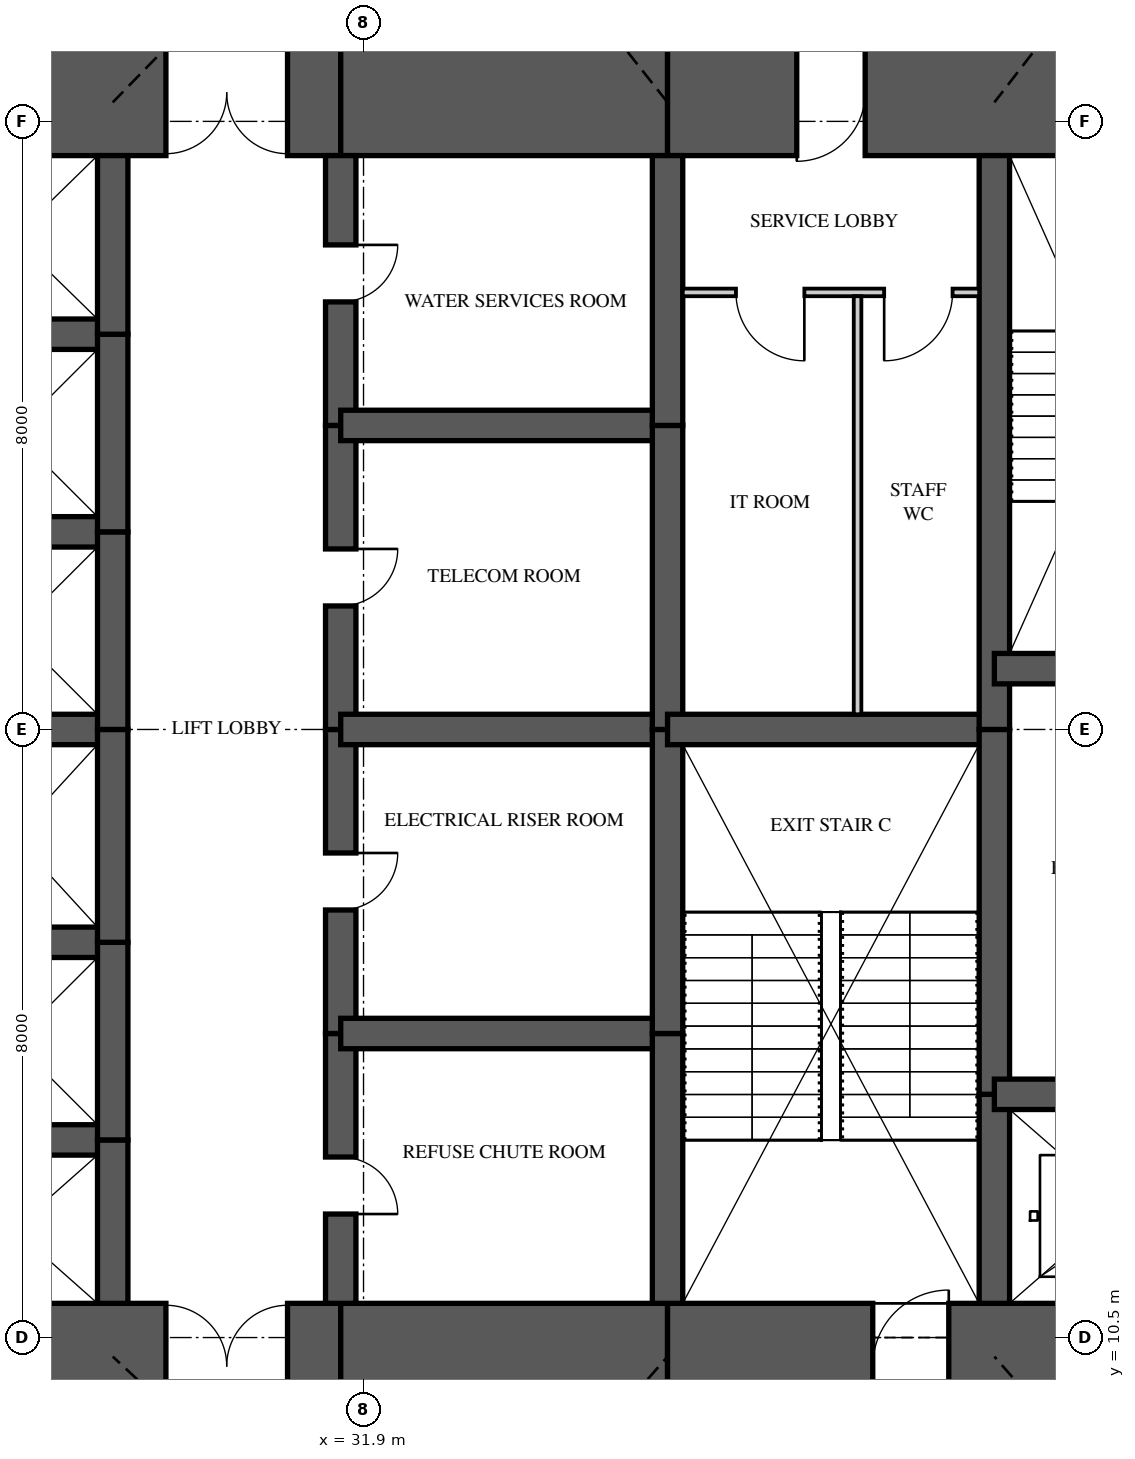
"""IFC4 building model, lengths in metres.
Left out: names, types, materials, properties, quantities, classifications, styles, units other than length and angle.
Written with IfcOpenShell. Run it as: python <this file> out.ifc"""

import sys

from ifc_helpers import new_model, si_unit, direction, frame, frame_2d, origin, place, context, subcontext, project, spatial, rectangle, extrude, element, fill, save


model = new_model("IFC4")
c1 = context("Model", 3, precision=1e-05, world=origin(), true_north=direction((0.0, 1.0)))
c2 = subcontext(c1, "Body", "Model", "MODEL_VIEW")
j1 = project(units=[si_unit("LENGTHUNIT", "METRE"), si_unit("PLANEANGLEUNIT", "RADIAN")], contexts=[c1])
p1 = place(None, origin())
s1 = spatial("IfcSite", under=j1, at=p1, CompositionType="ELEMENT")
p2 = place(p1, origin())
s2 = spatial("IfcBuilding", under=s1, at=p2, CompositionType="ELEMENT")
p3 = place(p2, frame((0.0, 0.0, 79.75)))
s3 = spatial("IfcBuildingStorey", under=s2, at=p3, CompositionType="ELEMENT", Elevation=79.75)
p4 = place(p3, frame((26.0, 10.125, 0.0), z_axis=(0.0, 0.0, 1.0), x_axis=(1.0, 0.0, 0.0)))
e1 = element("IfcWall", 1, at=p4, inside=s3, PredefinedType="SHEAR", context=c2, shape_type="SweptSolid", body=[
    extrude(rectangle(XDim=5.6, YDim=1.65, at=frame_2d((2.8, 0.0))), origin(), (0.0, 0.0, 1.0), 5.0),
])
p5 = place(p4, frame((3.3, 0.0, 0.0)))
e2 = element("IfcOpeningElement", 2, at=p5, cuts=e1, PredefinedType="OPENING", context=c2, shape_type="SweptSolid", body=[
    extrude(rectangle(XDim=1.6, YDim=2.1, at=frame_2d((0.8, 1.05))), frame((0.0, 0.835, 0.0), z_axis=(0.0, -1.0, 0.0), x_axis=(1.0, 0.0, 0.0)), (0.0, 0.0, 1.0), 1.67),
])
p6 = place(p3, frame((31.6, 10.125, 0.0), z_axis=(0.0, 0.0, 1.0), x_axis=(1.0, 0.0, 0.0)))
e3 = element("IfcWall", 3, at=p6, inside=s3, PredefinedType="SHEAR", context=c2, shape_type="SweptSolid", body=[
    extrude(rectangle(XDim=4.3, YDim=1.65, at=frame_2d((2.15, 0.0))), origin(), (0.0, 0.0, 1.0), 5.0),
])
p7 = place(p3, frame((35.9, 10.125, 0.0), z_axis=(0.0, 0.0, 1.0), x_axis=(1.0, 0.0, 0.0)))
e4 = element("IfcWall", 4, at=p7, inside=s3, PredefinedType="SHEAR", context=c2, shape_type="SweptSolid", body=[
    extrude(rectangle(XDim=8.375, YDim=1.65, at=frame_2d((4.188, 0.0))), origin(), (0.0, 0.0, 1.0), 5.0),
])
p8 = place(p7, frame((2.7, 0.0, 0.0)))
e5 = element("IfcOpeningElement", 5, at=p8, cuts=e4, PredefinedType="OPENING", context=c2, shape_type="SweptSolid", body=[
    extrude(rectangle(XDim=1.0, YDim=2.1, at=frame_2d((0.5, 1.05))), frame((0.0, 0.835, 0.0), z_axis=(0.0, -1.0, 0.0), x_axis=(1.0, 0.0, 0.0)), (0.0, 0.0, 1.0), 1.67),
])
p9 = place(p3, frame((44.275, 26.875, 0.0), z_axis=(0.0, 0.0, 1.0), x_axis=(-1.0, 0.0, 0.0)))
e6 = element("IfcWall", 6, at=p9, inside=s3, PredefinedType="SHEAR", context=c2, shape_type="SweptSolid", body=[
    extrude(rectangle(XDim=8.375, YDim=1.65, at=frame_2d((4.188, 0.0))), origin(), (0.0, 0.0, 1.0), 5.0),
])
p10 = place(p9, frame((5.775, 0.0, 0.0)))
e7 = element("IfcOpeningElement", 7, at=p10, cuts=e6, PredefinedType="OPENING", context=c2, shape_type="SweptSolid", body=[
    extrude(rectangle(XDim=0.9, YDim=2.1, at=frame_2d((0.45, 1.05))), frame((0.0, 0.835, 0.0), z_axis=(0.0, -1.0, 0.0), x_axis=(1.0, 0.0, 0.0)), (0.0, 0.0, 1.0), 1.67),
])
p11 = place(p3, frame((35.9, 26.875, 0.0), z_axis=(0.0, 0.0, 1.0), x_axis=(-1.0, 0.0, 0.0)))
e8 = element("IfcWall", 8, at=p11, inside=s3, PredefinedType="SHEAR", context=c2, shape_type="SweptSolid", body=[
    extrude(rectangle(XDim=4.3, YDim=1.65, at=frame_2d((2.15, 0.0))), origin(), (0.0, 0.0, 1.0), 5.0),
])
p12 = place(p3, frame((31.6, 26.875, 0.0), z_axis=(0.0, 0.0, 1.0), x_axis=(-1.0, 0.0, 0.0)))
e9 = element("IfcWall", 9, at=p12, inside=s3, PredefinedType="SHEAR", context=c2, shape_type="SweptSolid", body=[
    extrude(rectangle(XDim=5.6, YDim=1.65, at=frame_2d((2.8, 0.0))), origin(), (0.0, 0.0, 1.0), 5.0),
])
p13 = place(p12, frame((0.7, 0.0, 0.0)))
e10 = element("IfcOpeningElement", 10, at=p13, cuts=e9, PredefinedType="OPENING", context=c2, shape_type="SweptSolid", body=[
    extrude(rectangle(XDim=1.6, YDim=2.1, at=frame_2d((0.8, 1.05))), frame((0.0, 0.835, 0.0), z_axis=(0.0, -1.0, 0.0), x_axis=(1.0, 0.0, 0.0)), (0.0, 0.0, 1.0), 1.67),
])
p14 = place(p3, frame((28.6, 10.95, 0.0), z_axis=(0.0, 0.0, 1.0), x_axis=(0.0, 1.0, 0.0)))
e11 = element("IfcWall", 11, at=p14, inside=s3, PredefinedType="SHEAR", context=c2, shape_type="SweptSolid", body=[
    extrude(rectangle(XDim=2.15, YDim=0.4, at=frame_2d((1.075, 0.0))), origin(), (0.0, 0.0, 1.0), 5.0),
])
p15 = place(p3, frame((28.6, 13.1, 0.0), z_axis=(0.0, 0.0, 1.0), x_axis=(0.0, 1.0, 0.0)))
e12 = element("IfcWall", 12, at=p15, inside=s3, PredefinedType="SHEAR", context=c2, shape_type="SweptSolid", body=[
    extrude(rectangle(XDim=2.6, YDim=0.4, at=frame_2d((1.3, 0.0))), origin(), (0.0, 0.0, 1.0), 5.0),
])
p16 = place(p3, frame((28.6, 15.7, 0.0), z_axis=(0.0, 0.0, 1.0), x_axis=(0.0, 1.0, 0.0)))
e13 = element("IfcWall", 13, at=p16, inside=s3, PredefinedType="SHEAR", context=c2, shape_type="SweptSolid", body=[
    extrude(rectangle(XDim=2.8, YDim=0.4, at=frame_2d((1.4, 0.0))), origin(), (0.0, 0.0, 1.0), 5.0),
])
p17 = place(p3, frame((28.6, 18.5, 0.0), z_axis=(0.0, 0.0, 1.0), x_axis=(0.0, 1.0, 0.0)))
e14 = element("IfcWall", 14, at=p17, inside=s3, PredefinedType="SHEAR", context=c2, shape_type="SweptSolid", body=[
    extrude(rectangle(XDim=2.6, YDim=0.4, at=frame_2d((1.3, 0.0))), origin(), (0.0, 0.0, 1.0), 5.0),
])
p18 = place(p3, frame((28.6, 21.1, 0.0), z_axis=(0.0, 0.0, 1.0), x_axis=(0.0, 1.0, 0.0)))
e15 = element("IfcWall", 15, at=p18, inside=s3, PredefinedType="SHEAR", context=c2, shape_type="SweptSolid", body=[
    extrude(rectangle(XDim=2.6, YDim=0.4, at=frame_2d((1.3, 0.0))), origin(), (0.0, 0.0, 1.0), 5.0),
])
p19 = place(p3, frame((28.6, 23.7, 0.0), z_axis=(0.0, 0.0, 1.0), x_axis=(0.0, 1.0, 0.0)))
e16 = element("IfcWall", 16, at=p19, inside=s3, PredefinedType="SHEAR", context=c2, shape_type="SweptSolid", body=[
    extrude(rectangle(XDim=2.35, YDim=0.4, at=frame_2d((1.175, 0.0))), origin(), (0.0, 0.0, 1.0), 5.0),
])
p20 = place(p3, frame((31.6, 10.95, 0.0), z_axis=(0.0, 0.0, 1.0), x_axis=(0.0, 1.0, 0.0)))
e17 = element("IfcWall", 17, at=p20, inside=s3, PredefinedType="SHEAR", context=c2, shape_type="SweptSolid", body=[
    extrude(rectangle(XDim=3.55, YDim=0.4, at=frame_2d((1.775, 0.0))), origin(), (0.0, 0.0, 1.0), 5.0),
])
p21 = place(p20, frame((1.175, 0.0, 0.0)))
e18 = element("IfcOpeningElement", 18, at=p21, cuts=e17, PredefinedType="OPENING", context=c2, shape_type="SweptSolid", body=[
    extrude(rectangle(XDim=0.75, YDim=2.1, at=frame_2d((0.375, 1.05))), frame((0.0, 0.21, 0.0), z_axis=(0.0, -1.0, 0.0), x_axis=(1.0, 0.0, 0.0)), (0.0, 0.0, 1.0), 0.42),
])
p22 = place(p3, frame((31.6, 14.5, 0.0), z_axis=(0.0, 0.0, 1.0), x_axis=(0.0, 1.0, 0.0)))
e19 = element("IfcWall", 19, at=p22, inside=s3, PredefinedType="SHEAR", context=c2, shape_type="SweptSolid", body=[
    extrude(rectangle(XDim=4.0, YDim=0.4, at=frame_2d((2.0, 0.0))), origin(), (0.0, 0.0, 1.0), 5.0),
])
p23 = place(p22, frame((1.625, 0.0, 0.0)))
e20 = element("IfcOpeningElement", 20, at=p23, cuts=e19, PredefinedType="OPENING", context=c2, shape_type="SweptSolid", body=[
    extrude(rectangle(XDim=0.75, YDim=2.1, at=frame_2d((0.375, 1.05))), frame((0.0, 0.21, 0.0), z_axis=(0.0, -1.0, 0.0), x_axis=(1.0, 0.0, 0.0)), (0.0, 0.0, 1.0), 0.42),
])
p24 = place(p3, frame((31.6, 18.5, 0.0), z_axis=(0.0, 0.0, 1.0), x_axis=(0.0, 1.0, 0.0)))
e21 = element("IfcWall", 21, at=p24, inside=s3, PredefinedType="SHEAR", context=c2, shape_type="SweptSolid", body=[
    extrude(rectangle(XDim=4.0, YDim=0.4, at=frame_2d((2.0, 0.0))), origin(), (0.0, 0.0, 1.0), 5.0),
])
p25 = place(p24, frame((1.625, 0.0, 0.0)))
e22 = element("IfcOpeningElement", 22, at=p25, cuts=e21, PredefinedType="OPENING", context=c2, shape_type="SweptSolid", body=[
    extrude(rectangle(XDim=0.75, YDim=2.1, at=frame_2d((0.375, 1.05))), frame((0.0, 0.21, 0.0), z_axis=(0.0, -1.0, 0.0), x_axis=(1.0, 0.0, 0.0)), (0.0, 0.0, 1.0), 0.42),
])
p26 = place(p3, frame((31.6, 22.5, 0.0), z_axis=(0.0, 0.0, 1.0), x_axis=(0.0, 1.0, 0.0)))
e23 = element("IfcWall", 23, at=p26, inside=s3, PredefinedType="SHEAR", context=c2, shape_type="SweptSolid", body=[
    extrude(rectangle(XDim=3.55, YDim=0.4, at=frame_2d((1.775, 0.0))), origin(), (0.0, 0.0, 1.0), 5.0),
])
p27 = place(p26, frame((1.625, 0.0, 0.0)))
e24 = element("IfcOpeningElement", 24, at=p27, cuts=e23, PredefinedType="OPENING", context=c2, shape_type="SweptSolid", body=[
    extrude(rectangle(XDim=0.75, YDim=2.1, at=frame_2d((0.375, 1.05))), frame((0.0, 0.21, 0.0), z_axis=(0.0, -1.0, 0.0), x_axis=(1.0, 0.0, 0.0)), (0.0, 0.0, 1.0), 0.42),
])
p28 = place(p3, frame((35.9, 10.95, 0.0), z_axis=(0.0, 0.0, 1.0), x_axis=(0.0, 1.0, 0.0)))
e25 = element("IfcWall", 25, at=p28, inside=s3, PredefinedType="SHEAR", context=c2, shape_type="SweptSolid", body=[
    extrude(rectangle(XDim=3.55, YDim=0.4, at=frame_2d((1.775, 0.0))), origin(), (0.0, 0.0, 1.0), 5.0),
])
for number, where, z_axis, x_axis in (
    (26, (35.9, 14.5, 0.0), (0.0, 0.0, 1.0), (0.0, 1.0, 0.0)),
    (27, (35.9, 18.5, 0.0), (0.0, 0.0, 1.0), (0.0, 1.0, 0.0)),
):
    element("IfcWall", number, at=place(p3, frame(where, z_axis=z_axis, x_axis=x_axis)), inside=s3, PredefinedType="SHEAR", context=c2, shape_type="SweptSolid", body=[
        extrude(rectangle(XDim=4.0, YDim=0.4, at=frame_2d((2.0, 0.0))), origin(), (0.0, 0.0, 1.0), 5.0),
    ])
p29 = place(p3, frame((35.9, 22.5, 0.0), z_axis=(0.0, 0.0, 1.0), x_axis=(0.0, 1.0, 0.0)))
e28 = element("IfcWall", 28, at=p29, inside=s3, PredefinedType="SHEAR", context=c2, shape_type="SweptSolid", body=[
    extrude(rectangle(XDim=3.55, YDim=0.4, at=frame_2d((1.775, 0.0))), origin(), (0.0, 0.0, 1.0), 5.0),
])
p30 = place(p3, frame((40.2, 10.95, 0.0), z_axis=(0.0, 0.0, 1.0), x_axis=(0.0, 1.0, 0.0)))
e29 = element("IfcWall", 29, at=p30, inside=s3, PredefinedType="SHEAR", context=c2, shape_type="SweptSolid", body=[
    extrude(rectangle(XDim=2.75, YDim=0.4, at=frame_2d((1.375, 0.0))), origin(), (0.0, 0.0, 1.0), 5.0),
])
p31 = place(p3, frame((40.2, 13.7, 0.0), z_axis=(0.0, 0.0, 1.0), x_axis=(0.0, 1.0, 0.0)))
e30 = element("IfcWall", 30, at=p31, inside=s3, PredefinedType="SHEAR", context=c2, shape_type="SweptSolid", body=[
    extrude(rectangle(XDim=4.8, YDim=0.4, at=frame_2d((2.4, 0.0))), origin(), (0.0, 0.0, 1.0), 5.0),
])
p32 = place(p3, frame((40.2, 18.5, 0.0), z_axis=(0.0, 0.0, 1.0), x_axis=(0.0, 1.0, 0.0)))
e31 = element("IfcWall", 31, at=p32, inside=s3, PredefinedType="SHEAR", context=c2, shape_type="SweptSolid", body=[
    extrude(rectangle(XDim=7.55, YDim=0.4, at=frame_2d((3.775, 0.0))), origin(), (0.0, 0.0, 1.0), 5.0),
])
for number, where, z_axis, x_axis in (
    (32, (26.0, 13.1, 0.0), (0.0, 0.0, 1.0), (1.0, 0.0, 0.0)),
    (33, (26.0, 15.7, 0.0), (0.0, 0.0, 1.0), (1.0, 0.0, 0.0)),
    (34, (26.0, 18.5, 0.0), (0.0, 0.0, 1.0), (1.0, 0.0, 0.0)),
    (35, (26.0, 21.1, 0.0), (0.0, 0.0, 1.0), (1.0, 0.0, 0.0)),
    (36, (26.0, 23.7, 0.0), (0.0, 0.0, 1.0), (1.0, 0.0, 0.0)),
):
    element("IfcWall", number, at=place(p3, frame(where, z_axis=z_axis, x_axis=x_axis)), inside=s3, PredefinedType="SHEAR", context=c2, shape_type="SweptSolid", body=[
        extrude(rectangle(XDim=2.6, YDim=0.4, at=frame_2d((1.3, 0.0))), origin(), (0.0, 0.0, 1.0), 5.0),
    ])
for number, where, z_axis, x_axis in (
    (37, (31.6, 14.5, 0.0), (0.0, 0.0, 1.0), (1.0, 0.0, 0.0)),
    (38, (31.6, 18.5, 0.0), (0.0, 0.0, 1.0), (1.0, 0.0, 0.0)),
    (39, (31.6, 22.5, 0.0), (0.0, 0.0, 1.0), (1.0, 0.0, 0.0)),
):
    element("IfcWall", number, at=place(p3, frame(where, z_axis=z_axis, x_axis=x_axis)), inside=s3, PredefinedType="SHEAR", context=c2, shape_type="SweptSolid", body=[
        extrude(rectangle(XDim=4.3, YDim=0.4, at=frame_2d((2.15, 0.0))), origin(), (0.0, 0.0, 1.0), 5.0),
    ])
p33 = place(p3, frame((35.9, 18.5, 0.0), z_axis=(0.0, 0.0, 1.0), x_axis=(1.0, 0.0, 0.0)))
e40 = element("IfcWall", 40, at=p33, inside=s3, PredefinedType="SHEAR", context=c2, shape_type="SweptSolid", body=[
    extrude(rectangle(XDim=4.3, YDim=0.4, at=frame_2d((2.15, 0.0))), origin(), (0.0, 0.0, 1.0), 5.0),
])
p34 = place(p3, frame((40.2, 13.7, 0.0), z_axis=(0.0, 0.0, 1.0), x_axis=(1.0, 0.0, 0.0)))
e41 = element("IfcWall", 41, at=p34, inside=s3, PredefinedType="SHEAR", context=c2, shape_type="SweptSolid", body=[
    extrude(rectangle(XDim=3.6, YDim=0.4, at=frame_2d((1.8, 0.0))), origin(), (0.0, 0.0, 1.0), 5.0),
])
p35 = place(p34, frame((1.2, 0.0, 0.0)))
e42 = element("IfcOpeningElement", 42, at=p35, cuts=e41, PredefinedType="OPENING", context=c2, shape_type="SweptSolid", body=[
    extrude(rectangle(XDim=1.2, YDim=2.1, at=frame_2d((0.6, 1.05))), frame((0.0, 0.21, 0.0), z_axis=(0.0, -1.0, 0.0), x_axis=(1.0, 0.0, 0.0)), (0.0, 0.0, 1.0), 0.42),
])
p36 = place(p3, frame((40.2, 19.3, 0.0), z_axis=(0.0, 0.0, 1.0), x_axis=(1.0, 0.0, 0.0)))
e43 = element("IfcWall", 43, at=p36, inside=s3, PredefinedType="SHEAR", context=c2, shape_type="SweptSolid", body=[
    extrude(rectangle(XDim=3.6, YDim=0.4, at=frame_2d((1.8, 0.0))), origin(), (0.0, 0.0, 1.0), 5.0),
])
p37 = place(p36, frame((1.3, 0.0, 0.0)))
e44 = element("IfcOpeningElement", 44, at=p37, cuts=e43, PredefinedType="OPENING", context=c2, shape_type="SweptSolid", body=[
    extrude(rectangle(XDim=1.0, YDim=2.1, at=frame_2d((0.5, 1.05))), frame((0.0, 0.21, 0.0), z_axis=(0.0, -1.0, 0.0), x_axis=(1.0, 0.0, 0.0)), (0.0, 0.0, 1.0), 0.42),
])
p38 = place(p3, frame((36.1, 24.25, 0.0), z_axis=(0.0, 0.0, 1.0), x_axis=(1.0, 0.0, 0.0)))
e45 = element("IfcWall", 45, at=p38, inside=s3, PredefinedType="PARTITIONING", context=c2, shape_type="SweptSolid", body=[
    extrude(rectangle(XDim=3.9, YDim=0.1, at=frame_2d((1.95, 0.0))), origin(), (0.0, 0.0, 1.0), 4.72),
])
p39 = place(p38, frame((0.7, 0.0, 0.0)))
e46 = element("IfcOpeningElement", 46, at=p39, cuts=e45, PredefinedType="OPENING", context=c2, shape_type="SweptSolid", body=[
    extrude(rectangle(XDim=0.9, YDim=2.1, at=frame_2d((0.45, 1.05))), frame((0.0, 0.06, 0.0), z_axis=(0.0, -1.0, 0.0), x_axis=(1.0, 0.0, 0.0)), (0.0, 0.0, 1.0), 0.12),
])
p40 = place(p38, frame((2.65, 0.0, 0.0)))
e47 = element("IfcOpeningElement", 47, at=p40, cuts=e45, PredefinedType="OPENING", context=c2, shape_type="SweptSolid", body=[
    extrude(rectangle(XDim=0.9, YDim=2.1, at=frame_2d((0.45, 1.05))), frame((0.0, 0.06, 0.0), z_axis=(0.0, -1.0, 0.0), x_axis=(1.0, 0.0, 0.0)), (0.0, 0.0, 1.0), 0.12),
])
p41 = place(p3, frame((38.4, 18.7, 0.0), z_axis=(0.0, 0.0, 1.0), x_axis=(0.0, 1.0, 0.0)))
e48 = element("IfcWall", 48, at=p41, inside=s3, PredefinedType="PARTITIONING", context=c2, shape_type="SweptSolid", body=[
    extrude(rectangle(XDim=5.5, YDim=0.1, at=frame_2d((2.75, 0.0))), origin(), (0.0, 0.0, 1.0), 4.72),
])
p42 = place(p39, frame((0.9, 0.0, 0.0), z_axis=(0.0, 0.0, 1.0), x_axis=(-1.0, 0.0, 0.0)))
e49 = element("IfcDoor", 49, at=p42, inside=s3, OperationType="SINGLE_SWING_LEFT", PredefinedType="DOOR", context=c2, shape_type="SweptSolid", body=[
    extrude(rectangle(XDim=0.9, YDim=2.1, at=frame_2d((0.45, 1.05))), frame((0.0, 0.025, 0.0), z_axis=(0.0, -1.0, 0.0), x_axis=(1.0, 0.0, 0.0)), (0.0, 0.0, 1.0), 0.05),
])
fill(e46, e49)
p43 = place(p40, frame((0.9, 0.0, 0.0), z_axis=(0.0, 0.0, 1.0), x_axis=(-1.0, 0.0, 0.0)))
e50 = element("IfcDoor", 50, at=p43, inside=s3, OperationType="SINGLE_SWING_RIGHT", PredefinedType="DOOR", context=c2, shape_type="SweptSolid", body=[
    extrude(rectangle(XDim=0.9, YDim=2.1, at=frame_2d((0.45, 1.05))), frame((0.0, 0.025, 0.0), z_axis=(0.0, -1.0, 0.0), x_axis=(1.0, 0.0, 0.0)), (0.0, 0.0, 1.0), 0.05),
])
fill(e47, e50)
p44 = place(p5, origin())
e51 = element("IfcDoor", 51, at=p44, inside=s3, OperationType="DOUBLE_DOOR_SINGLE_SWING", PredefinedType="DOOR", context=c2, shape_type="SweptSolid", body=[
    extrude(rectangle(XDim=1.6, YDim=2.1, at=frame_2d((0.8, 1.05))), frame((0.0, 0.025, 0.0), z_axis=(0.0, -1.0, 0.0), x_axis=(1.0, 0.0, 0.0)), (0.0, 0.0, 1.0), 0.05),
])
fill(e2, e51)
p45 = place(p13, origin())
e52 = element("IfcDoor", 52, at=p45, inside=s3, OperationType="DOUBLE_DOOR_SINGLE_SWING", PredefinedType="DOOR", context=c2, shape_type="SweptSolid", body=[
    extrude(rectangle(XDim=1.6, YDim=2.1, at=frame_2d((0.8, 1.05))), frame((0.0, 0.025, 0.0), z_axis=(0.0, -1.0, 0.0), x_axis=(1.0, 0.0, 0.0)), (0.0, 0.0, 1.0), 0.05),
])
fill(e10, e52)
p46 = place(p21, frame((0.75, 0.0, 0.0), z_axis=(0.0, 0.0, 1.0), x_axis=(-1.0, 0.0, 0.0)))
e53 = element("IfcDoor", 53, at=p46, inside=s3, OperationType="SINGLE_SWING_RIGHT", PredefinedType="DOOR", context=c2, shape_type="SweptSolid", body=[
    extrude(rectangle(XDim=0.75, YDim=2.1, at=frame_2d((0.375, 1.05))), frame((0.0, 0.025, 0.0), z_axis=(0.0, -1.0, 0.0), x_axis=(1.0, 0.0, 0.0)), (0.0, 0.0, 1.0), 0.05),
])
fill(e18, e53)
p47 = place(p23, frame((0.75, 0.0, 0.0), z_axis=(0.0, 0.0, 1.0), x_axis=(-1.0, 0.0, 0.0)))
e54 = element("IfcDoor", 54, at=p47, inside=s3, OperationType="SINGLE_SWING_LEFT", PredefinedType="DOOR", context=c2, shape_type="SweptSolid", body=[
    extrude(rectangle(XDim=0.75, YDim=2.1, at=frame_2d((0.375, 1.05))), frame((0.0, 0.025, 0.0), z_axis=(0.0, -1.0, 0.0), x_axis=(1.0, 0.0, 0.0)), (0.0, 0.0, 1.0), 0.05),
])
fill(e20, e54)
p48 = place(p25, frame((0.75, 0.0, 0.0), z_axis=(0.0, 0.0, 1.0), x_axis=(-1.0, 0.0, 0.0)))
e55 = element("IfcDoor", 55, at=p48, inside=s3, OperationType="SINGLE_SWING_LEFT", PredefinedType="DOOR", context=c2, shape_type="SweptSolid", body=[
    extrude(rectangle(XDim=0.75, YDim=2.1, at=frame_2d((0.375, 1.05))), frame((0.0, 0.025, 0.0), z_axis=(0.0, -1.0, 0.0), x_axis=(1.0, 0.0, 0.0)), (0.0, 0.0, 1.0), 0.05),
])
fill(e22, e55)
p49 = place(p27, frame((0.75, 0.0, 0.0), z_axis=(0.0, 0.0, 1.0), x_axis=(-1.0, 0.0, 0.0)))
e56 = element("IfcDoor", 56, at=p49, inside=s3, OperationType="SINGLE_SWING_LEFT", PredefinedType="DOOR", context=c2, shape_type="SweptSolid", body=[
    extrude(rectangle(XDim=0.75, YDim=2.1, at=frame_2d((0.375, 1.05))), frame((0.0, 0.025, 0.0), z_axis=(0.0, -1.0, 0.0), x_axis=(1.0, 0.0, 0.0)), (0.0, 0.0, 1.0), 0.05),
])
fill(e24, e56)
p50 = place(p8, origin())
e57 = element("IfcDoor", 57, at=p50, inside=s3, OperationType="SINGLE_SWING_RIGHT", PredefinedType="DOOR", context=c2, shape_type="SweptSolid", body=[
    extrude(rectangle(XDim=1.0, YDim=2.1, at=frame_2d((0.5, 1.05))), frame((0.0, 0.025, 0.0), z_axis=(0.0, -1.0, 0.0), x_axis=(1.0, 0.0, 0.0)), (0.0, 0.0, 1.0), 0.05),
])
fill(e5, e57)
p51 = place(p10, origin())
e58 = element("IfcDoor", 58, at=p51, inside=s3, OperationType="SINGLE_SWING_RIGHT", PredefinedType="DOOR", context=c2, shape_type="SweptSolid", body=[
    extrude(rectangle(XDim=0.9, YDim=2.1, at=frame_2d((0.45, 1.05))), frame((0.0, 0.47, 0.0), z_axis=(0.0, -1.0, 0.0), x_axis=(1.0, 0.0, 0.0)), (0.0, 0.0, 1.0), 0.8),
])
fill(e7, e58)
save(model, sys.argv[1])
